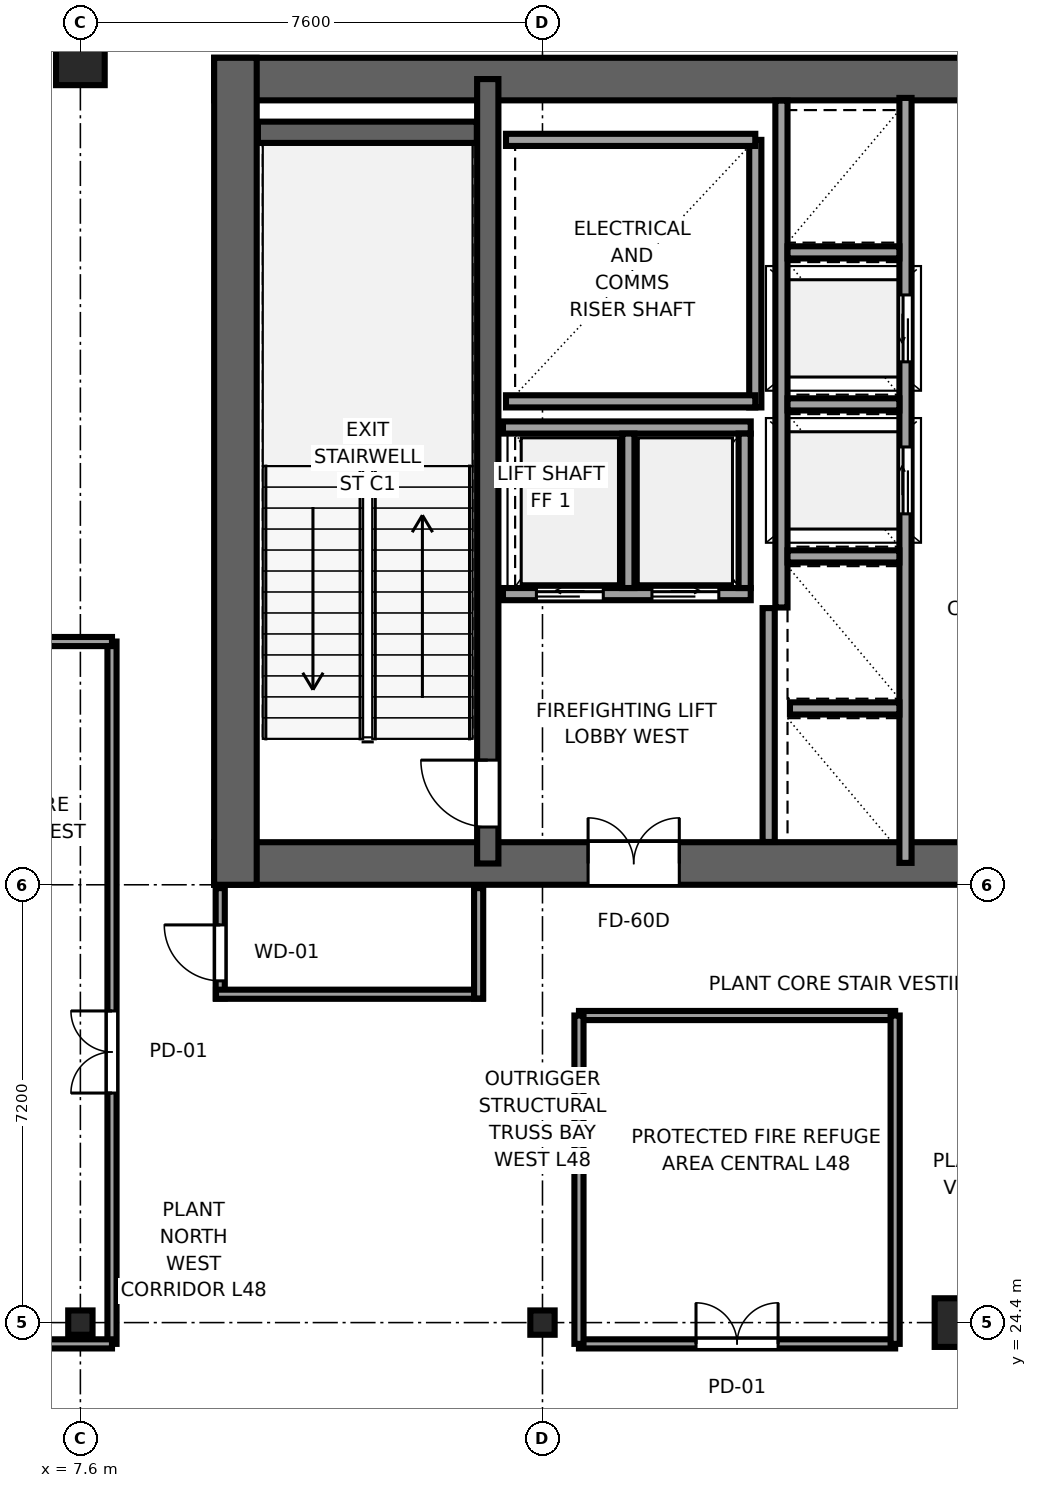
"""IFC4 building model, lengths in metres.
Left out: names, types, materials, properties, quantities, classifications, styles, units other than length and angle.
Written with IfcOpenShell. Run it as: python <this file> out.ifc"""

import sys

from ifc_helpers import new_model, si_unit, direction, frame, frame_2d, origin, origin_2d, place, context, subcontext, project, spatial, rectangle, i_section, extrude, source, transform, mapped, element, fill, save


model = new_model("IFC4")
c1 = context("Model", 3, precision=1e-05, world=origin(), true_north=direction((0.0, 1.0)))
c2 = subcontext(c1, "Body", "Model", "MODEL_VIEW")
j1 = project(units=[si_unit("LENGTHUNIT", "METRE"), si_unit("PLANEANGLEUNIT", "RADIAN")], contexts=[c1])
p1 = place(None, origin())
s1 = spatial("IfcSite", under=j1, at=p1, CompositionType="ELEMENT")
p2 = place(p1, origin())
s2 = spatial("IfcBuilding", under=s1, at=p2, CompositionType="ELEMENT")
p3 = place(p2, frame((0.0, 0.0, 182.55)))
s3 = spatial("IfcBuildingStorey", under=s2, at=p3, CompositionType="ELEMENT", Elevation=182.55)
p4 = place(p3, frame((9.8, 31.95, 0.0), z_axis=(0.0, 0.0, 1.0), x_axis=(1.0, 0.0, 0.0)))
e1 = element("IfcWall", 1, at=p4, inside=s3, PredefinedType="SHEAR", context=c2, shape_type="SweptSolid", body=[
    extrude(rectangle(XDim=26.4, YDim=0.7, at=frame_2d((13.2, 0.0))), origin(), (0.0, 0.0, 1.0), 5.0),
])
p5 = place(p4, frame((7.65, 0.0, 0.0), z_axis=(0.0, 0.0, 1.0), x_axis=(-1.0, 0.0, 0.0)))
e2 = element("IfcOpeningElement", 2, at=p5, cuts=e1, PredefinedType="OPENING", context=c2, shape_type="SweptSolid", body=[
    extrude(rectangle(XDim=1.5, YDim=2.04, at=frame_2d((0.75, 1.02))), frame((0.0, 0.36, 0.0), z_axis=(0.0, -1.0, 0.0), x_axis=(1.0, 0.0, 0.0)), (0.0, 0.0, 1.0), 0.72),
])
p6 = place(p4, frame((13.95, 0.0, 0.0), z_axis=(0.0, 0.0, 1.0), x_axis=(-1.0, 0.0, 0.0)))
e3 = element("IfcOpeningElement", 3, at=p6, cuts=e1, PredefinedType="OPENING", context=c2, shape_type="SweptSolid", body=[
    extrude(rectangle(XDim=1.5, YDim=2.04, at=frame_2d((0.75, 1.02))), frame((0.0, 0.36, 0.0), z_axis=(0.0, -1.0, 0.0), x_axis=(1.0, 0.0, 0.0)), (0.0, 0.0, 1.0), 0.72),
])
p7 = place(p4, frame((20.25, 0.0, 0.0), z_axis=(0.0, 0.0, 1.0), x_axis=(-1.0, 0.0, 0.0)))
e4 = element("IfcOpeningElement", 4, at=p7, cuts=e1, PredefinedType="OPENING", context=c2, shape_type="SweptSolid", body=[
    extrude(rectangle(XDim=1.5, YDim=2.04, at=frame_2d((0.75, 1.02))), frame((0.0, 0.36, 0.0), z_axis=(0.0, -1.0, 0.0), x_axis=(1.0, 0.0, 0.0)), (0.0, 0.0, 1.0), 0.72),
])
p8 = place(p3, frame((9.8, 44.85, 0.0), z_axis=(0.0, 0.0, 1.0), x_axis=(1.0, 0.0, 0.0)))
e5 = element("IfcWall", 5, at=p8, inside=s3, PredefinedType="SHEAR", context=c2, shape_type="SweptSolid", body=[
    extrude(rectangle(XDim=26.4, YDim=0.7, at=frame_2d((13.2, 0.0))), origin(), (0.0, 0.0, 1.0), 5.0),
])
p9 = place(p3, frame((10.15, 31.6, 0.0), z_axis=(0.0, 0.0, 1.0), x_axis=(0.0, 1.0, 0.0)))
e6 = element("IfcWall", 6, at=p9, inside=s3, PredefinedType="SHEAR", context=c2, shape_type="SweptSolid", body=[
    extrude(rectangle(XDim=13.6, YDim=0.7, at=frame_2d((6.8, 0.0))), origin(), (0.0, 0.0, 1.0), 5.0),
])
p10 = place(p3, frame((14.3, 31.95, 0.0), z_axis=(0.0, 0.0, 1.0), x_axis=(0.0, 1.0, 0.0)))
e7 = element("IfcWall", 7, at=p10, inside=s3, PredefinedType="SHEAR", context=c2, shape_type="SweptSolid", body=[
    extrude(rectangle(XDim=12.9, YDim=0.35, at=frame_2d((6.45, 0.0))), origin(), (0.0, 0.0, 1.0), 5.0),
])
p11 = place(p10, frame((0.6, 0.0, 0.0)))
e8 = element("IfcOpeningElement", 8, at=p11, cuts=e7, PredefinedType="OPENING", context=c2, shape_type="SweptSolid", body=[
    extrude(rectangle(XDim=1.1, YDim=2.12, at=frame_2d((0.55, 1.06))), frame((0.0, 0.185, 0.0), z_axis=(0.0, -1.0, 0.0), x_axis=(1.0, 0.0, 0.0)), (0.0, 0.0, 1.0), 0.37),
])
p12 = place(p3, frame((10.52, 43.975, 0.0), z_axis=(0.0, 0.0, 1.0), x_axis=(1.0, 0.0, 0.0)))
e9 = element("IfcWall", 9, at=p12, inside=s3, PredefinedType="SHEAR", context=c2, shape_type="SweptSolid", body=[
    extrude(rectangle(XDim=3.6, YDim=0.35, at=frame_2d((1.8, 0.0))), origin(), (0.0, 0.0, 1.0), 5.0),
])
m1 = source(origin(), c2, "Body", "SweptSolid", [
    extrude(i_section(OverallWidth=0.4, OverallDepth=0.4, WebThickness=0.02, FlangeThickness=0.035, at=origin_2d()), origin(), (0.0, 0.0, 1.0), 5.0),
])
for number, where, z_axis, x_axis in (
    (10, (7.6, 24.4, 0.0), (0.0, 0.0, 1.0), (1.0, 0.0, 0.0)),
    (11, (15.2, 24.4, 0.0), (0.0, 0.0, 1.0), (1.0, 0.0, 0.0)),
):
    element("IfcColumn", number, at=place(p3, frame(where, z_axis=z_axis, x_axis=x_axis)), inside=s3, PredefinedType="COLUMN", context=c2, shape_type="MappedRepresentation", body=[
        mapped(m1, transform((0.0, 0.0, 0.0), x_axis=(1.0, 0.0, 0.0), y_axis=(0.0, 1.0, 0.0), z_axis=(0.0, 0.0, 1.0), scale=1.0)),
    ])
m2 = source(origin(), c2, "Body", "SweptSolid", [
    extrude(rectangle(XDim=0.8, YDim=0.8, at=origin_2d()), origin(), (0.0, 0.0, 1.0), 5.0),
])
for number, where, z_axis, x_axis in (
    (12, (22.05, 24.4, 0.0), (0.0, 0.0, 1.0), (1.0, 0.0, 0.0)),
    (13, (7.6, 45.15, 0.0), (0.0, 0.0, 1.0), (1.0, 0.0, 0.0)),
):
    element("IfcColumn", number, at=place(p3, frame(where, z_axis=z_axis, x_axis=x_axis)), inside=s3, PredefinedType="COLUMN", context=c2, shape_type="MappedRepresentation", body=[
        mapped(m2, transform((0.0, 0.0, 0.0), x_axis=(1.0, 0.0, 0.0), y_axis=(0.0, 1.0, 0.0), z_axis=(0.0, 0.0, 1.0), scale=1.0)),
    ])
p13 = place(p3, frame((18.7, 39.45, 0.0), z_axis=(0.0, 0.0, 1.0), x_axis=(0.0, 1.0, 0.0)))
e14 = element("IfcWall", 14, at=p13, inside=s3, PredefinedType="SOLIDWALL", context=c2, shape_type="SweptSolid", body=[
    extrude(rectangle(XDim=4.4, YDim=0.2, at=frame_2d((2.2, 0.0))), origin(), (0.0, 0.0, 1.0), 4.82),
])
for number, where, z_axis, x_axis in (
    (15, (14.6, 39.55, 0.0), (0.0, 0.0, 1.0), (1.0, 0.0, 0.0)),
    (16, (14.6, 43.85, 0.0), (0.0, 0.0, 1.0), (1.0, 0.0, 0.0)),
):
    element("IfcWall", number, at=place(p3, frame(where, z_axis=z_axis, x_axis=x_axis)), inside=s3, PredefinedType="SOLIDWALL", context=c2, shape_type="SweptSolid", body=[
        extrude(rectangle(XDim=4.1, YDim=0.2, at=frame_2d((2.05, 0.0))), origin(), (0.0, 0.0, 1.0), 4.82),
    ])
p14 = place(p3, frame((18.92, 32.304, 0.0), z_axis=(0.0, 0.0, 1.0), x_axis=(0.0, 1.0, 0.0)))
e17 = element("IfcWall", 17, at=p14, inside=s3, PredefinedType="SOLIDWALL", context=c2, shape_type="SweptSolid", body=[
    extrude(rectangle(XDim=3.846, YDim=0.2, at=frame_2d((1.923, 0.0))), origin(), (0.0, 0.0, 1.0), 4.82),
])
p15 = place(p3, frame((21.17, 31.96, 0.0), z_axis=(0.0, 0.0, 1.0), x_axis=(0.0, 1.0, 0.0)))
e18 = element("IfcWall", 18, at=p15, inside=s3, PredefinedType="SOLIDWALL", context=c2, shape_type="SweptSolid", body=[
    extrude(rectangle(XDim=12.58, YDim=0.2, at=frame_2d((6.29, 0.0))), origin(), (0.0, 0.0, 1.0), 4.82),
])
p16 = place(p15, frame((5.74, 0.0, 0.0)))
e19 = element("IfcOpeningElement", 19, at=p16, cuts=e18, PredefinedType="OPENING", context=c2, shape_type="SweptSolid", body=[
    extrude(rectangle(XDim=1.1, YDim=2.12, at=frame_2d((0.55, 1.06))), frame((0.0, 0.11, 0.0), z_axis=(0.0, -1.0, 0.0), x_axis=(1.0, 0.0, 0.0)), (0.0, 0.0, 1.0), 0.22),
])
p17 = place(p15, frame((8.24, 0.0, 0.0)))
e20 = element("IfcOpeningElement", 20, at=p17, cuts=e18, PredefinedType="OPENING", context=c2, shape_type="SweptSolid", body=[
    extrude(rectangle(XDim=1.1, YDim=2.12, at=frame_2d((0.55, 1.06))), frame((0.0, 0.11, 0.0), z_axis=(0.0, -1.0, 0.0), x_axis=(1.0, 0.0, 0.0)), (0.0, 0.0, 1.0), 0.22),
])
p18 = place(p3, frame((19.13, 36.16, 0.0), z_axis=(0.0, 0.0, 1.0), x_axis=(0.0, 1.0, 0.0)))
e21 = element("IfcWall", 21, at=p18, inside=s3, PredefinedType="SOLIDWALL", context=c2, shape_type="SweptSolid", body=[
    extrude(rectangle(XDim=8.336, YDim=0.2, at=frame_2d((4.168, 0.0))), origin(), (0.0, 0.0, 1.0), 4.82),
])
p19 = place(p3, frame((19.27, 34.5, 0.0), z_axis=(0.0, 0.0, 1.0), x_axis=(1.0, 0.0, 0.0)))
e22 = element("IfcWall", 22, at=p19, inside=s3, PredefinedType="SOLIDWALL", context=c2, shape_type="SweptSolid", body=[
    extrude(rectangle(XDim=1.8, YDim=0.2, at=frame_2d((0.9, 0.0))), origin(), (0.0, 0.0, 1.0), 4.82),
])
for number, where, z_axis, x_axis in (
    (23, (19.23, 37.0, 0.0), (0.0, 0.0, 1.0), (1.0, 0.0, 0.0)),
    (24, (19.23, 39.5, 0.0), (0.0, 0.0, 1.0), (1.0, 0.0, 0.0)),
    (25, (19.23, 42.0, 0.0), (0.0, 0.0, 1.0), (1.0, 0.0, 0.0)),
):
    element("IfcWall", number, at=place(p3, frame(where, z_axis=z_axis, x_axis=x_axis)), inside=s3, PredefinedType="SOLIDWALL", context=c2, shape_type="SweptSolid", body=[
        extrude(rectangle(XDim=1.84, YDim=0.2, at=frame_2d((0.92, 0.0))), origin(), (0.0, 0.0, 1.0), 4.82),
    ])
p20 = place(p3, frame((14.55, 36.38, 0.0), z_axis=(0.0, 0.0, 1.0), x_axis=(1.0, 0.0, 0.0)))
e26 = element("IfcWall", 26, at=p20, inside=s3, PredefinedType="SOLIDWALL", context=c2, shape_type="SweptSolid", body=[
    extrude(rectangle(XDim=4.075, YDim=0.2, at=frame_2d((2.038, 0.0))), origin(), (0.0, 0.0, 1.0), 4.82),
])
p21 = place(p20, frame((0.55, 0.0, 0.0)))
e27 = element("IfcOpeningElement", 27, at=p21, cuts=e26, PredefinedType="OPENING", context=c2, shape_type="SweptSolid", body=[
    extrude(rectangle(XDim=1.1, YDim=2.12, at=frame_2d((0.55, 1.06))), frame((0.0, 0.11, 0.0), z_axis=(0.0, -1.0, 0.0), x_axis=(1.0, 0.0, 0.0)), (0.0, 0.0, 1.0), 0.22),
])
p22 = place(p20, frame((2.45, 0.0, 0.0)))
e28 = element("IfcOpeningElement", 28, at=p22, cuts=e26, PredefinedType="OPENING", context=c2, shape_type="SweptSolid", body=[
    extrude(rectangle(XDim=1.1, YDim=2.12, at=frame_2d((0.55, 1.06))), frame((0.0, 0.11, 0.0), z_axis=(0.0, -1.0, 0.0), x_axis=(1.0, 0.0, 0.0)), (0.0, 0.0, 1.0), 0.22),
])
p23 = place(p3, frame((14.55, 39.12, 0.0), z_axis=(0.0, 0.0, 1.0), x_axis=(1.0, 0.0, 0.0)))
e29 = element("IfcWall", 29, at=p23, inside=s3, PredefinedType="SOLIDWALL", context=c2, shape_type="SweptSolid", body=[
    extrude(rectangle(XDim=4.075, YDim=0.2, at=frame_2d((2.038, 0.0))), origin(), (0.0, 0.0, 1.0), 4.82),
])
for number, where, z_axis, x_axis in (
    (30, (18.525, 36.48, 0.0), (0.0, 0.0, 1.0), (0.0, 1.0, 0.0)),
    (31, (16.613, 36.48, 0.0), (0.0, 0.0, 1.0), (0.0, 1.0, 0.0)),
):
    element("IfcWall", number, at=place(p3, frame(where, z_axis=z_axis, x_axis=x_axis)), inside=s3, PredefinedType="SOLIDWALL", context=c2, shape_type="SweptSolid", body=[
        extrude(rectangle(XDim=2.54, YDim=0.2, at=frame_2d((1.27, 0.0))), origin(), (0.0, 0.0, 1.0), 4.82),
    ])
p24 = place(p3, frame((8.12, 24.05, 0.0), z_axis=(0.0, 0.0, 1.0), x_axis=(0.0, 1.0, 0.0)))
e32 = element("IfcWall", 32, at=p24, inside=s3, PredefinedType="PARTITIONING", context=c2, shape_type="SweptSolid", body=[
    extrude(rectangle(XDim=11.55, YDim=0.15, at=frame_2d((5.775, 0.0))), origin(), (0.0, 0.0, 1.0), 4.82),
])
p25 = place(p24, frame((4.125, 0.0, 0.0)))
e33 = element("IfcOpeningElement", 33, at=p25, cuts=e32, PredefinedType="OPENING", context=c2, shape_type="SweptSolid", body=[
    extrude(rectangle(XDim=1.35, YDim=2.15, at=frame_2d((0.675, 1.075))), frame((0.0, 0.085, 0.0), z_axis=(0.0, -1.0, 0.0), x_axis=(1.0, 0.0, 0.0)), (0.0, 0.0, 1.0), 0.17),
])
for number, where, z_axis, x_axis in (
    (34, (4.0, 24.05, 0.0), (0.0, 0.0, 1.0), (1.0, 0.0, 0.0)),
    (35, (4.0, 35.6, 0.0), (0.0, 0.0, 1.0), (1.0, 0.0, 0.0)),
):
    element("IfcWall", number, at=place(p3, frame(where, z_axis=z_axis, x_axis=x_axis)), inside=s3, PredefinedType="PARTITIONING", context=c2, shape_type="SweptSolid", body=[
        extrude(rectangle(XDim=4.12, YDim=0.15, at=frame_2d((2.06, 0.0))), origin(), (0.0, 0.0, 1.0), 4.82),
    ])
p26 = place(p3, frame((15.8, 24.05, 0.0), z_axis=(0.0, 0.0, 1.0), x_axis=(1.0, 0.0, 0.0)))
e36 = element("IfcWall", 36, at=p26, inside=s3, PredefinedType="PARTITIONING", context=c2, shape_type="SweptSolid", body=[
    extrude(rectangle(XDim=5.2, YDim=0.15, at=frame_2d((2.6, 0.0))), origin(), (0.0, 0.0, 1.0), 4.82),
])
p27 = place(p26, frame((1.925, 0.0, 0.0)))
e37 = element("IfcOpeningElement", 37, at=p27, cuts=e36, PredefinedType="OPENING", context=c2, shape_type="SweptSolid", body=[
    extrude(rectangle(XDim=1.35, YDim=2.15, at=frame_2d((0.675, 1.075))), frame((0.0, 0.085, 0.0), z_axis=(0.0, -1.0, 0.0), x_axis=(1.0, 0.0, 0.0)), (0.0, 0.0, 1.0), 0.17),
])
p28 = place(p3, frame((15.8, 29.45, 0.0), z_axis=(0.0, 0.0, 1.0), x_axis=(1.0, 0.0, 0.0)))
e38 = element("IfcWall", 38, at=p28, inside=s3, PredefinedType="PARTITIONING", context=c2, shape_type="SweptSolid", body=[
    extrude(rectangle(XDim=5.2, YDim=0.15, at=frame_2d((2.6, 0.0))), origin(), (0.0, 0.0, 1.0), 4.82),
])
for number, where, z_axis, x_axis in (
    (39, (15.8, 24.05, 0.0), (0.0, 0.0, 1.0), (0.0, 1.0, 0.0)),
    (40, (21.0, 24.05, 0.0), (0.0, 0.0, 1.0), (0.0, 1.0, 0.0)),
):
    element("IfcWall", number, at=place(p3, frame(where, z_axis=z_axis, x_axis=x_axis)), inside=s3, PredefinedType="PARTITIONING", context=c2, shape_type="SweptSolid", body=[
        extrude(rectangle(XDim=5.4, YDim=0.15, at=frame_2d((2.7, 0.0))), origin(), (0.0, 0.0, 1.0), 4.82),
    ])
p29 = place(p3, frame((9.9, 29.73, 0.0), z_axis=(0.0, 0.0, 1.0), x_axis=(0.0, 1.0, 0.0)))
e41 = element("IfcWall", 41, at=p29, inside=s3, PredefinedType="PARTITIONING", context=c2, shape_type="SweptSolid", body=[
    extrude(rectangle(XDim=1.815, YDim=0.15, at=frame_2d((0.907, 0.0))), origin(), (0.0, 0.0, 1.0), 4.82),
])
p30 = place(p29, frame((0.29, 0.0, 0.0)))
e42 = element("IfcOpeningElement", 42, at=p30, cuts=e41, PredefinedType="OPENING", context=c2, shape_type="SweptSolid", body=[
    extrude(rectangle(XDim=0.92, YDim=2.01, at=frame_2d((0.46, 1.005))), frame((0.0, 0.085, 0.0), z_axis=(0.0, -1.0, 0.0), x_axis=(1.0, 0.0, 0.0)), (0.0, 0.0, 1.0), 0.17),
])
p31 = place(p3, frame((9.83, 29.8, 0.0), z_axis=(0.0, 0.0, 1.0), x_axis=(1.0, 0.0, 0.0)))
e43 = element("IfcWall", 43, at=p31, inside=s3, PredefinedType="PARTITIONING", context=c2, shape_type="SweptSolid", body=[
    extrude(rectangle(XDim=4.39, YDim=0.15, at=frame_2d((2.195, 0.0))), origin(), (0.0, 0.0, 1.0), 4.82),
])
p32 = place(p3, frame((14.15, 29.73, 0.0), z_axis=(0.0, 0.0, 1.0), x_axis=(0.0, 1.0, 0.0)))
e44 = element("IfcWall", 44, at=p32, inside=s3, PredefinedType="PARTITIONING", context=c2, shape_type="SweptSolid", body=[
    extrude(rectangle(XDim=1.815, YDim=0.15, at=frame_2d((0.907, 0.0))), origin(), (0.0, 0.0, 1.0), 4.82),
])
m3 = source(origin(), c2, "Body", "SweptSolid", [
    extrude(rectangle(XDim=1.1, YDim=2.12, at=frame_2d((0.55, 1.06))), frame((0.0, 0.025, 0.0), z_axis=(0.0, -1.0, 0.0), x_axis=(1.0, 0.0, 0.0)), (0.0, 0.0, 1.0), 0.05),
])
p33 = place(p11, origin())
e45 = element("IfcDoor", 45, at=p33, inside=s3, OperationType="SINGLE_SWING_RIGHT", PredefinedType="DOOR", context=c2, shape_type="MappedRepresentation", body=[
    mapped(m3, transform((0.0, 0.0, 0.0), x_axis=(1.0, 0.0, 0.0), y_axis=(0.0, 1.0, 0.0), z_axis=(0.0, 0.0, 1.0), scale=1.0)),
])
fill(e8, e45)
m4 = source(origin(), c2, "Body", "SweptSolid", [
    extrude(rectangle(XDim=1.5, YDim=2.04, at=frame_2d((0.75, 1.02))), frame((0.0, 0.025, 0.0), z_axis=(0.0, -1.0, 0.0), x_axis=(1.0, 0.0, 0.0)), (0.0, 0.0, 1.0), 0.05),
])
p34 = place(p5, origin())
e46 = element("IfcDoor", 46, at=p34, inside=s3, OperationType="DOUBLE_DOOR_SINGLE_SWING", PredefinedType="DOOR", context=c2, shape_type="MappedRepresentation", body=[
    mapped(m4, transform((0.0, 0.0, 0.0), x_axis=(1.0, 0.0, 0.0), y_axis=(0.0, 1.0, 0.0), z_axis=(0.0, 0.0, 1.0), scale=1.0)),
])
fill(e2, e46)
m5 = source(origin(), c2, "Body", "SweptSolid", [
    extrude(rectangle(XDim=1.1, YDim=2.12, at=frame_2d((0.55, 1.06))), frame((0.0, 0.025, 0.0), z_axis=(0.0, -1.0, 0.0), x_axis=(1.0, 0.0, 0.0)), (0.0, 0.0, 1.0), 0.05),
])
p35 = place(p16, origin())
e47 = element("IfcDoor", 47, at=p35, inside=s3, OperationType="SLIDING_TO_RIGHT", PredefinedType="DOOR", context=c2, shape_type="MappedRepresentation", body=[
    mapped(m5, transform((0.0, 0.0, 0.0), x_axis=(1.0, 0.0, 0.0), y_axis=(0.0, 1.0, 0.0), z_axis=(0.0, 0.0, 1.0), scale=1.0)),
])
fill(e19, e47)
p36 = place(p17, origin())
e48 = element("IfcDoor", 48, at=p36, inside=s3, OperationType="SLIDING_TO_LEFT", PredefinedType="DOOR", context=c2, shape_type="MappedRepresentation", body=[
    mapped(m5, transform((0.0, 0.0, 0.0), x_axis=(1.0, 0.0, 0.0), y_axis=(0.0, 1.0, 0.0), z_axis=(0.0, 0.0, 1.0), scale=1.0)),
])
fill(e20, e48)
p37 = place(p21, origin())
e49 = element("IfcDoor", 49, at=p37, inside=s3, OperationType="SLIDING_TO_LEFT", PredefinedType="DOOR", context=c2, shape_type="MappedRepresentation", body=[
    mapped(m5, transform((0.0, 0.0, 0.0), x_axis=(1.0, 0.0, 0.0), y_axis=(0.0, 1.0, 0.0), z_axis=(0.0, 0.0, 1.0), scale=1.0)),
])
fill(e27, e49)
p38 = place(p22, origin())
e50 = element("IfcDoor", 50, at=p38, inside=s3, OperationType="SLIDING_TO_RIGHT", PredefinedType="DOOR", context=c2, shape_type="MappedRepresentation", body=[
    mapped(m5, transform((0.0, 0.0, 0.0), x_axis=(1.0, 0.0, 0.0), y_axis=(0.0, 1.0, 0.0), z_axis=(0.0, 0.0, 1.0), scale=1.0)),
])
fill(e28, e50)
m6 = source(origin(), c2, "Body", "SweptSolid", [
    extrude(rectangle(XDim=1.35, YDim=2.15, at=frame_2d((0.675, 1.075))), frame((0.0, 0.025, 0.0), z_axis=(0.0, -1.0, 0.0), x_axis=(1.0, 0.0, 0.0)), (0.0, 0.0, 1.0), 0.05),
])
p39 = place(p25, origin())
e51 = element("IfcDoor", 51, at=p39, inside=s3, OperationType="DOUBLE_DOOR_SINGLE_SWING", PredefinedType="DOOR", context=c2, shape_type="MappedRepresentation", body=[
    mapped(m6, transform((0.0, 0.0, 0.0), x_axis=(1.0, 0.0, 0.0), y_axis=(0.0, 1.0, 0.0), z_axis=(0.0, 0.0, 1.0), scale=1.0)),
])
fill(e33, e51)
p40 = place(p27, origin())
e52 = element("IfcDoor", 52, at=p40, inside=s3, OperationType="DOUBLE_DOOR_SINGLE_SWING", PredefinedType="DOOR", context=c2, shape_type="MappedRepresentation", body=[
    mapped(m6, transform((0.0, 0.0, 0.0), x_axis=(1.0, 0.0, 0.0), y_axis=(0.0, 1.0, 0.0), z_axis=(0.0, 0.0, 1.0), scale=1.0)),
])
fill(e37, e52)
m7 = source(origin(), c2, "Body", "SweptSolid", [
    extrude(rectangle(XDim=0.92, YDim=2.01, at=frame_2d((0.46, 1.005))), frame((0.0, 0.025, 0.0), z_axis=(0.0, -1.0, 0.0), x_axis=(1.0, 0.0, 0.0)), (0.0, 0.0, 1.0), 0.05),
])
p41 = place(p30, origin())
e53 = element("IfcDoor", 53, at=p41, inside=s3, OperationType="SINGLE_SWING_RIGHT", PredefinedType="DOOR", context=c2, shape_type="MappedRepresentation", body=[
    mapped(m7, transform((0.0, 0.0, 0.0), x_axis=(1.0, 0.0, 0.0), y_axis=(0.0, 1.0, 0.0), z_axis=(0.0, 0.0, 1.0), scale=1.0)),
])
fill(e42, e53)
save(model, sys.argv[1])
